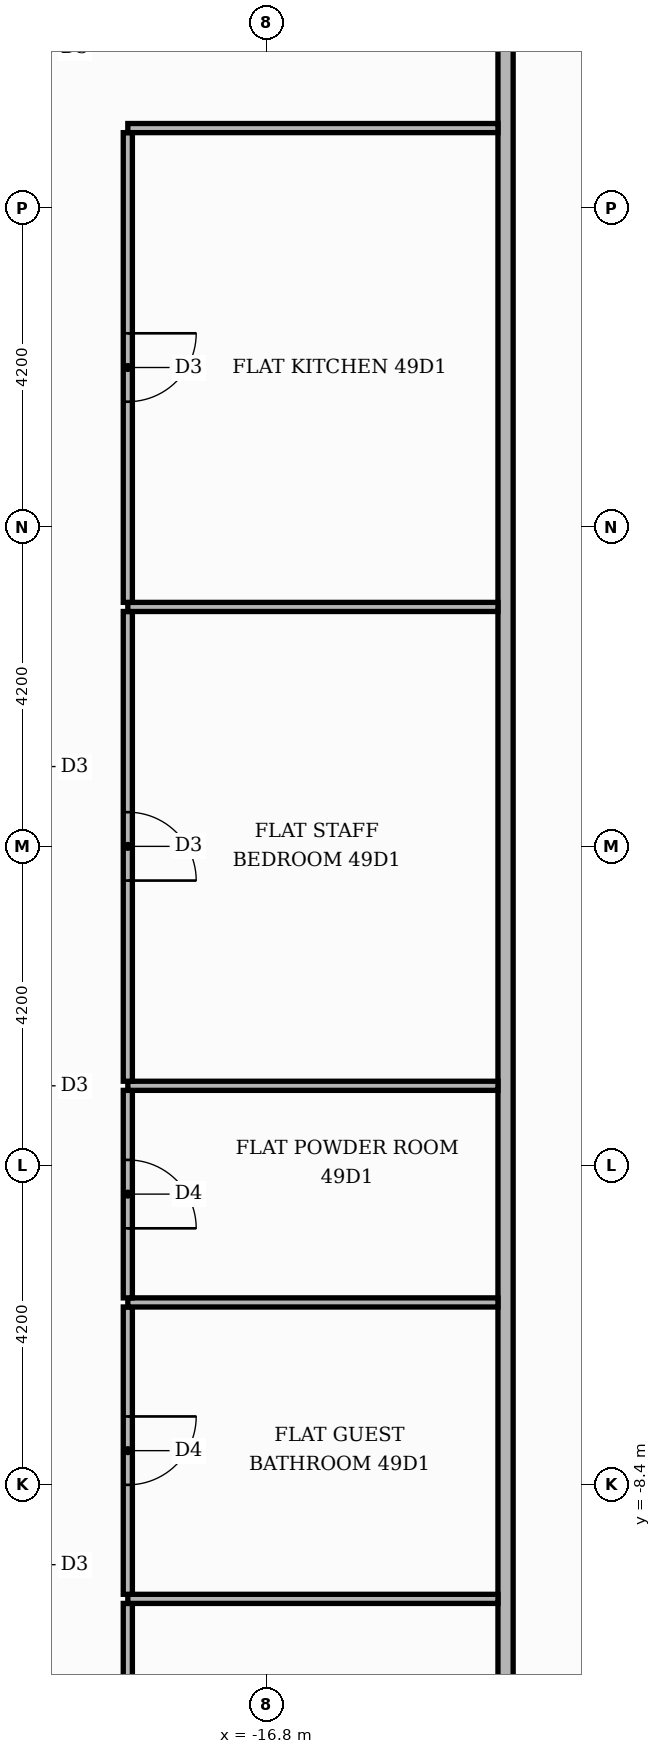
"""IFC4 building model, lengths in metres.
Left out: names, types, materials, properties, quantities, classifications, styles, units other than length and angle.
Written with IfcOpenShell. Run it as: python <this file> out.ifc"""

import sys

from ifc_helpers import new_model, si_unit, direction, frame, frame_2d, origin, place, context, subcontext, project, spatial, rectangle, extrude, element, fill, save


model = new_model("IFC4")
c1 = context("Model", 3, precision=1e-05, world=origin(), true_north=direction((0.0, 1.0)))
c2 = subcontext(c1, "Body", "Model", "MODEL_VIEW")
j1 = project(units=[si_unit("LENGTHUNIT", "METRE"), si_unit("PLANEANGLEUNIT", "RADIAN")], contexts=[c1])
p1 = place(None, origin())
s1 = spatial("IfcSite", under=j1, at=p1, CompositionType="ELEMENT")
p2 = place(p1, origin())
s2 = spatial("IfcBuilding", under=s1, at=p2, CompositionType="ELEMENT")
p3 = place(p2, frame((0.0, 0.0, 207.9)))
s3 = spatial("IfcBuildingStorey", under=s2, at=p3, CompositionType="ELEMENT", Elevation=207.9)
p4 = place(p3, frame((-18.62, -13.55, 0.0), z_axis=(0.0, 0.0, 1.0), x_axis=(0.0, 1.0, 0.0)))
e1 = element("IfcWall", 1, at=p4, inside=s3, PredefinedType="PARTITIONING", context=c2, shape_type="SweptSolid", body=[
    extrude(rectangle(XDim=3.59, YDim=0.12, at=frame_2d((1.795, 0.0))), origin(), (0.0, 0.0, 1.0), 3.48),
])
p5 = place(p4, frame((1.325, 0.0, 0.0)))
e2 = element("IfcOpeningElement", 2, at=p5, cuts=e1, PredefinedType="OPENING", context=c2, shape_type="SweptSolid", body=[
    extrude(rectangle(XDim=0.9, YDim=2.1, at=frame_2d((0.45, 1.05))), frame((0.0, 0.07, 0.0), z_axis=(0.0, -1.0, 0.0), x_axis=(1.0, 0.0, 0.0)), (0.0, 0.0, 1.0), 0.14),
])
p6 = place(p3, frame((-13.65, -13.55, 0.0), z_axis=(0.0, 0.0, 1.0), x_axis=(0.0, 1.0, 0.0)))
e3 = element("IfcWall", 3, at=p6, inside=s3, PredefinedType="PARTITIONING", context=c2, shape_type="SweptSolid", body=[
    extrude(rectangle(XDim=27.1, YDim=0.2, at=frame_2d((13.55, 0.0))), origin(), (0.0, 0.0, 1.0), 3.48),
])
p7 = place(p6, frame((24.55, 0.0, 0.0)))
e4 = element("IfcOpeningElement", 4, at=p7, cuts=e3, PredefinedType="OPENING", context=c2, shape_type="SweptSolid", body=[
    extrude(rectangle(XDim=1.1, YDim=2.4, at=frame_2d((0.55, 1.2))), frame((0.0, 0.11, 0.0), z_axis=(0.0, -1.0, 0.0), x_axis=(1.0, 0.0, 0.0)), (0.0, 0.0, 1.0), 0.22),
])
p8 = place(p3, frame((-18.62, -9.9, 0.0), z_axis=(0.0, 0.0, 1.0), x_axis=(1.0, 0.0, 0.0)))
e5 = element("IfcWall", 5, at=p8, inside=s3, PredefinedType="PARTITIONING", context=c2, shape_type="SweptSolid", body=[
    extrude(rectangle(XDim=4.87, YDim=0.12, at=frame_2d((2.435, 0.0))), origin(), (0.0, 0.0, 1.0), 3.48),
])
p9 = place(p3, frame((-18.62, -9.84, 0.0), z_axis=(0.0, 0.0, 1.0), x_axis=(0.0, 1.0, 0.0)))
e6 = element("IfcWall", 6, at=p9, inside=s3, PredefinedType="PARTITIONING", context=c2, shape_type="SweptSolid", body=[
    extrude(rectangle(XDim=3.78, YDim=0.12, at=frame_2d((1.89, 0.0))), origin(), (0.0, 0.0, 1.0), 3.48),
])
p10 = place(p9, frame((1.44, 0.0, 0.0)))
e7 = element("IfcOpeningElement", 7, at=p10, cuts=e6, PredefinedType="OPENING", context=c2, shape_type="SweptSolid", body=[
    extrude(rectangle(XDim=0.9, YDim=2.1, at=frame_2d((0.45, 1.05))), frame((0.0, 0.07, 0.0), z_axis=(0.0, -1.0, 0.0), x_axis=(1.0, 0.0, 0.0)), (0.0, 0.0, 1.0), 0.14),
])
p11 = place(p3, frame((-18.62, -6.0, 0.0), z_axis=(0.0, 0.0, 1.0), x_axis=(1.0, 0.0, 0.0)))
e8 = element("IfcWall", 8, at=p11, inside=s3, PredefinedType="PARTITIONING", context=c2, shape_type="SweptSolid", body=[
    extrude(rectangle(XDim=4.87, YDim=0.12, at=frame_2d((2.435, 0.0))), origin(), (0.0, 0.0, 1.0), 3.48),
])
p12 = place(p3, frame((-18.62, -5.94, 0.0), z_axis=(0.0, 0.0, 1.0), x_axis=(0.0, 1.0, 0.0)))
e9 = element("IfcWall", 9, at=p12, inside=s3, PredefinedType="PARTITIONING", context=c2, shape_type="SweptSolid", body=[
    extrude(rectangle(XDim=2.73, YDim=0.12, at=frame_2d((1.365, 0.0))), origin(), (0.0, 0.0, 1.0), 3.48),
])
p13 = place(p12, frame((0.915, 0.0, 0.0)))
e10 = element("IfcOpeningElement", 10, at=p13, cuts=e9, PredefinedType="OPENING", context=c2, shape_type="SweptSolid", body=[
    extrude(rectangle(XDim=0.9, YDim=2.1, at=frame_2d((0.45, 1.05))), frame((0.0, 0.07, 0.0), z_axis=(0.0, -1.0, 0.0), x_axis=(1.0, 0.0, 0.0)), (0.0, 0.0, 1.0), 0.14),
])
p14 = place(p3, frame((-18.62, -3.15, 0.0), z_axis=(0.0, 0.0, 1.0), x_axis=(1.0, 0.0, 0.0)))
e11 = element("IfcWall", 11, at=p14, inside=s3, PredefinedType="PARTITIONING", context=c2, shape_type="SweptSolid", body=[
    extrude(rectangle(XDim=4.87, YDim=0.12, at=frame_2d((2.435, 0.0))), origin(), (0.0, 0.0, 1.0), 3.48),
])
p15 = place(p3, frame((-18.62, -3.09, 0.0), z_axis=(0.0, 0.0, 1.0), x_axis=(0.0, 1.0, 0.0)))
e12 = element("IfcWall", 12, at=p15, inside=s3, PredefinedType="PARTITIONING", context=c2, shape_type="SweptSolid", body=[
    extrude(rectangle(XDim=6.18, YDim=0.12, at=frame_2d((3.09, 0.0))), origin(), (0.0, 0.0, 1.0), 3.48),
])
p16 = place(p15, frame((2.64, 0.0, 0.0)))
e13 = element("IfcOpeningElement", 13, at=p16, cuts=e12, PredefinedType="OPENING", context=c2, shape_type="SweptSolid", body=[
    extrude(rectangle(XDim=0.9, YDim=2.1, at=frame_2d((0.45, 1.05))), frame((0.0, 0.07, 0.0), z_axis=(0.0, -1.0, 0.0), x_axis=(1.0, 0.0, 0.0)), (0.0, 0.0, 1.0), 0.14),
])
p17 = place(p3, frame((-18.62, 3.15, 0.0), z_axis=(0.0, 0.0, 1.0), x_axis=(1.0, 0.0, 0.0)))
e14 = element("IfcWall", 14, at=p17, inside=s3, PredefinedType="PARTITIONING", context=c2, shape_type="SweptSolid", body=[
    extrude(rectangle(XDim=4.87, YDim=0.12, at=frame_2d((2.435, 0.0))), origin(), (0.0, 0.0, 1.0), 3.48),
])
p18 = place(p3, frame((-18.62, 3.21, 0.0), z_axis=(0.0, 0.0, 1.0), x_axis=(0.0, 1.0, 0.0)))
e15 = element("IfcWall", 15, at=p18, inside=s3, PredefinedType="PARTITIONING", context=c2, shape_type="SweptSolid", body=[
    extrude(rectangle(XDim=6.18, YDim=0.12, at=frame_2d((3.09, 0.0))), origin(), (0.0, 0.0, 1.0), 3.48),
])
p19 = place(p18, frame((2.64, 0.0, 0.0)))
e16 = element("IfcOpeningElement", 16, at=p19, cuts=e15, PredefinedType="OPENING", context=c2, shape_type="SweptSolid", body=[
    extrude(rectangle(XDim=0.9, YDim=2.1, at=frame_2d((0.45, 1.05))), frame((0.0, 0.07, 0.0), z_axis=(0.0, -1.0, 0.0), x_axis=(1.0, 0.0, 0.0)), (0.0, 0.0, 1.0), 0.14),
])
p20 = place(p3, frame((-18.62, 9.45, 0.0), z_axis=(0.0, 0.0, 1.0), x_axis=(1.0, 0.0, 0.0)))
e17 = element("IfcWall", 17, at=p20, inside=s3, PredefinedType="PARTITIONING", context=c2, shape_type="SweptSolid", body=[
    extrude(rectangle(XDim=4.87, YDim=0.12, at=frame_2d((2.435, 0.0))), origin(), (0.0, 0.0, 1.0), 3.48),
])
p21 = place(p19, frame((0.9, 0.0, 0.0), z_axis=(0.0, 0.0, 1.0), x_axis=(-1.0, 0.0, 0.0)))
e18 = element("IfcDoor", 18, at=p21, inside=s3, OperationType="SINGLE_SWING_RIGHT", PredefinedType="DOOR", context=c2, shape_type="SweptSolid", body=[
    extrude(rectangle(XDim=0.9, YDim=2.1, at=frame_2d((0.45, 1.05))), frame((0.0, 0.025, 0.0), z_axis=(0.0, -1.0, 0.0), x_axis=(1.0, 0.0, 0.0)), (0.0, 0.0, 1.0), 0.05),
])
fill(e16, e18)
p22 = place(p16, frame((0.9, 0.0, 0.0), z_axis=(0.0, 0.0, 1.0), x_axis=(-1.0, 0.0, 0.0)))
e19 = element("IfcDoor", 19, at=p22, inside=s3, OperationType="SINGLE_SWING_LEFT", PredefinedType="DOOR", context=c2, shape_type="SweptSolid", body=[
    extrude(rectangle(XDim=0.9, YDim=2.1, at=frame_2d((0.45, 1.05))), frame((0.0, 0.025, 0.0), z_axis=(0.0, -1.0, 0.0), x_axis=(1.0, 0.0, 0.0)), (0.0, 0.0, 1.0), 0.05),
])
fill(e13, e19)
p23 = place(p13, frame((0.9, 0.0, 0.0), z_axis=(0.0, 0.0, 1.0), x_axis=(-1.0, 0.0, 0.0)))
e20 = element("IfcDoor", 20, at=p23, inside=s3, OperationType="SINGLE_SWING_LEFT", PredefinedType="DOOR", context=c2, shape_type="SweptSolid", body=[
    extrude(rectangle(XDim=0.9, YDim=2.1, at=frame_2d((0.45, 1.05))), frame((0.0, 0.025, 0.0), z_axis=(0.0, -1.0, 0.0), x_axis=(1.0, 0.0, 0.0)), (0.0, 0.0, 1.0), 0.05),
])
fill(e10, e20)
p24 = place(p10, frame((0.9, 0.0, 0.0), z_axis=(0.0, 0.0, 1.0), x_axis=(-1.0, 0.0, 0.0)))
e21 = element("IfcDoor", 21, at=p24, inside=s3, OperationType="SINGLE_SWING_RIGHT", PredefinedType="DOOR", context=c2, shape_type="SweptSolid", body=[
    extrude(rectangle(XDim=0.9, YDim=2.1, at=frame_2d((0.45, 1.05))), frame((0.0, 0.025, 0.0), z_axis=(0.0, -1.0, 0.0), x_axis=(1.0, 0.0, 0.0)), (0.0, 0.0, 1.0), 0.05),
])
fill(e7, e21)
save(model, sys.argv[1])
